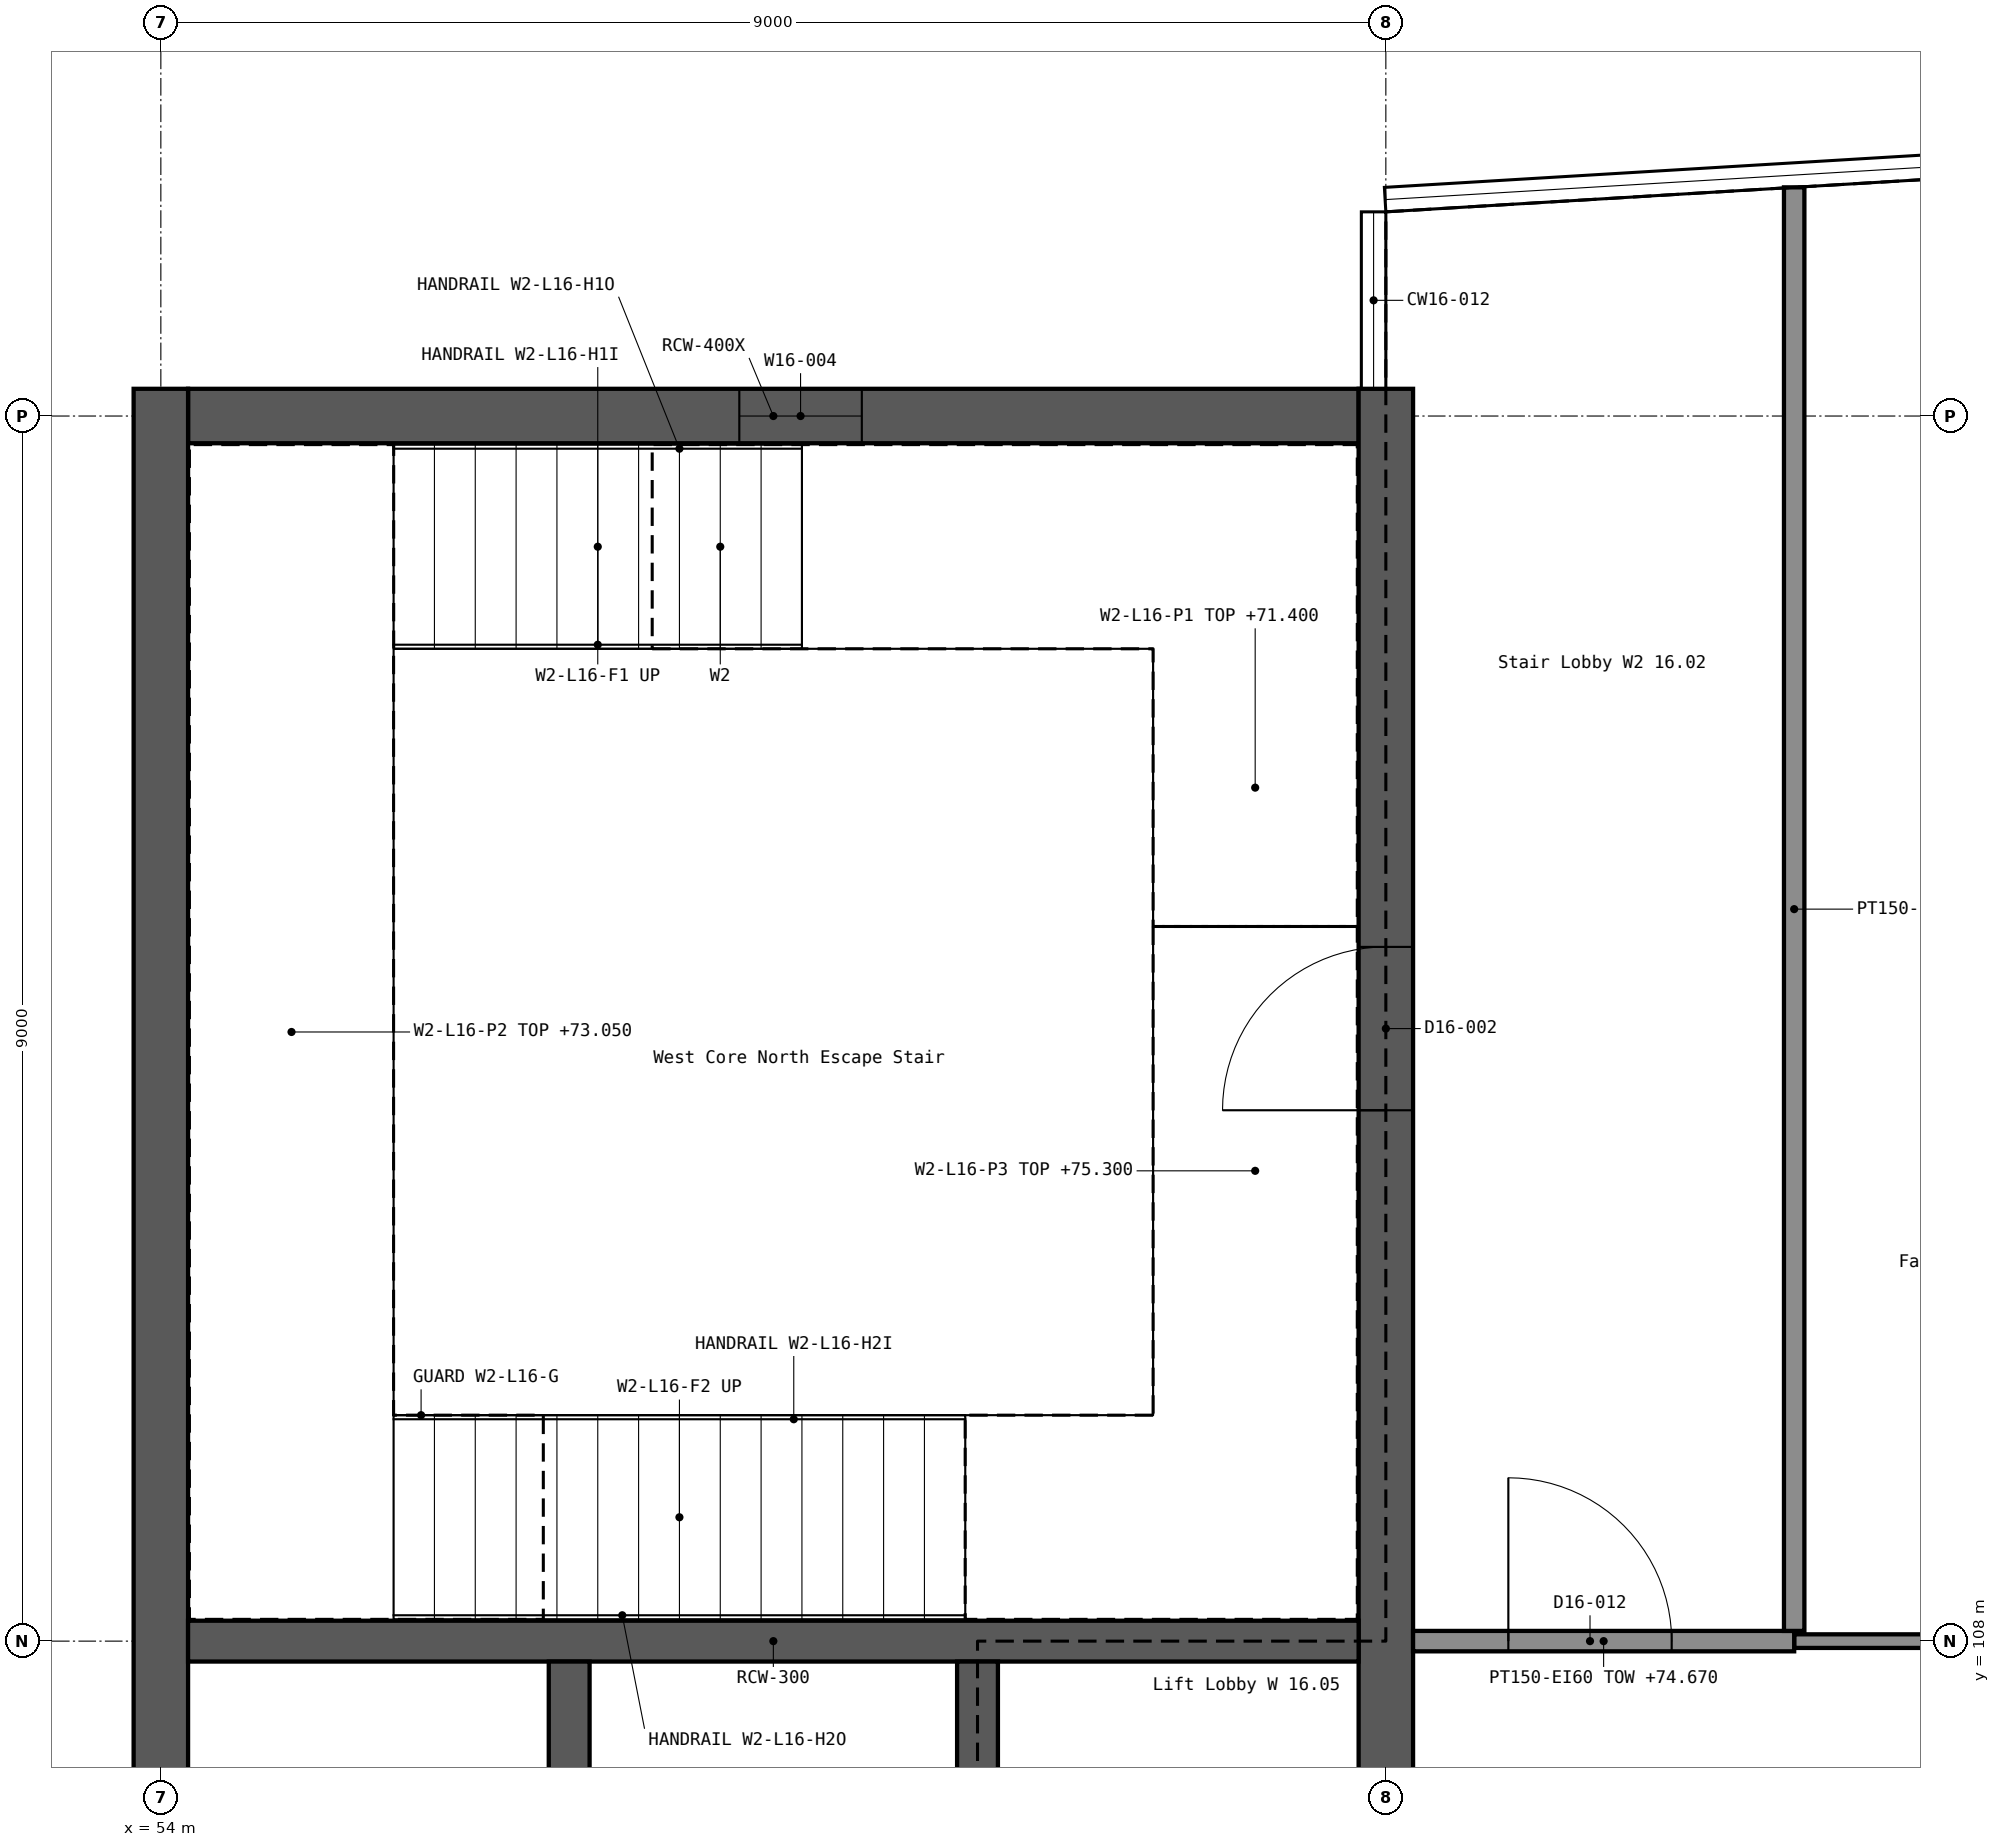
"""IFC4 building model, lengths in metres.
Left out: names, types, materials, properties, quantities, classifications, styles, units other than length and angle.
Written with IfcOpenShell. Run it as: python <this file> out.ifc"""

import sys

from ifc_helpers import new_model, si_unit, direction, frame, frame_2d, origin, place, context, subcontext, project, spatial, rectangle, extrude, element, fill, save


model = new_model("IFC4")
c1 = context("Model", 3, precision=1e-05, world=origin(), true_north=direction((0.0, 1.0)))
c2 = subcontext(c1, "Body", "Model", "MODEL_VIEW")
j1 = project(units=[si_unit("LENGTHUNIT", "METRE"), si_unit("PLANEANGLEUNIT", "RADIAN")], contexts=[c1])
p1 = place(None, origin())
s1 = spatial("IfcSite", under=j1, at=p1, CompositionType="ELEMENT")
p2 = place(p1, origin())
s2 = spatial("IfcBuilding", under=s1, at=p2, CompositionType="ELEMENT")
p3 = place(p2, frame((0.0, 0.0, 71.4)))
s3 = spatial("IfcBuildingStorey", under=s2, at=p3, CompositionType="ELEMENT", Elevation=71.4)
p4 = place(p3, frame((54.2, 117.0, 0.0), z_axis=(0.0, 0.0, 1.0), x_axis=(1.0, 0.0, 0.0)))
e1 = element("IfcWall", 1, at=p4, inside=s3, PredefinedType="SHEAR", context=c2, shape_type="SweptSolid", body=[
    extrude(rectangle(XDim=8.6, YDim=0.4, at=frame_2d((4.3, 0.0))), origin(), (0.0, 0.0, 1.0), 3.9),
])
p5 = place(p4, frame((4.05, 0.0, 1.2)))
e2 = element("IfcOpeningElement", 2, at=p5, cuts=e1, PredefinedType="OPENING", context=c2, shape_type="SweptSolid", body=[
    extrude(rectangle(XDim=0.9, YDim=1.5, at=frame_2d((0.45, 0.75))), frame((0.0, 0.211, 0.0), z_axis=(0.0, -1.0, 0.0), x_axis=(1.0, 0.0, 0.0)), (0.0, 0.0, 1.0), 0.422),
])
p6 = place(p3, frame((54.0, 89.8, 0.0), z_axis=(0.0, 0.0, 1.0), x_axis=(0.0, 1.0, 0.0)))
e3 = element("IfcWall", 3, at=p6, inside=s3, PredefinedType="SHEAR", context=c2, shape_type="SweptSolid", body=[
    extrude(rectangle(XDim=27.4, YDim=0.4, at=frame_2d((13.7, 0.0))), origin(), (0.0, 0.0, 1.0), 3.9),
])
p7 = place(p3, frame((63.0, 89.8, 0.0), z_axis=(0.0, 0.0, 1.0), x_axis=(0.0, 1.0, 0.0)))
e4 = element("IfcWall", 4, at=p7, inside=s3, PredefinedType="SHEAR", context=c2, shape_type="SweptSolid", body=[
    extrude(rectangle(XDim=27.4, YDim=0.4, at=frame_2d((13.7, 0.0))), origin(), (0.0, 0.0, 1.0), 3.9),
])
p8 = place(p7, frame((4.1, 0.0, 0.0)))
e5 = element("IfcOpeningElement", 5, at=p8, cuts=e4, PredefinedType="OPENING", context=c2, shape_type="SweptSolid", body=[
    extrude(rectangle(XDim=1.2, YDim=2.1, at=frame_2d((0.6, 1.05))), frame((0.0, 0.211, 0.0), z_axis=(0.0, -1.0, 0.0), x_axis=(1.0, 0.0, 0.0)), (0.0, 0.0, 1.0), 0.422),
])
p9 = place(p7, frame((22.1, 0.0, 0.0)))
e6 = element("IfcOpeningElement", 6, at=p9, cuts=e4, PredefinedType="OPENING", context=c2, shape_type="SweptSolid", body=[
    extrude(rectangle(XDim=1.2, YDim=2.1, at=frame_2d((0.6, 1.05))), frame((0.0, 0.211, 0.0), z_axis=(0.0, -1.0, 0.0), x_axis=(1.0, 0.0, 0.0)), (0.0, 0.0, 1.0), 0.422),
])
p10 = place(p7, frame((12.5, 0.0, 0.0)))
e7 = element("IfcOpeningElement", 7, at=p10, cuts=e4, PredefinedType="OPENING", context=c2, shape_type="SweptSolid", body=[
    extrude(rectangle(XDim=2.0, YDim=2.1, at=frame_2d((1.0, 1.05))), frame((0.0, 0.211, 0.0), z_axis=(0.0, -1.0, 0.0), x_axis=(1.0, 0.0, 0.0)), (0.0, 0.0, 1.0), 0.422),
])
p11 = place(p3, frame((54.2, 108.0, 0.0), z_axis=(0.0, 0.0, 1.0), x_axis=(1.0, 0.0, 0.0)))
e8 = element("IfcWall", 8, at=p11, inside=s3, PredefinedType="SHEAR", context=c2, shape_type="SweptSolid", body=[
    extrude(rectangle(XDim=8.6, YDim=0.3, at=frame_2d((4.3, 0.0))), origin(), (0.0, 0.0, 1.0), 3.9),
])
p12 = place(p3, frame((57.0, 99.15, 0.0), z_axis=(0.0, 0.0, 1.0), x_axis=(0.0, 1.0, 0.0)))
e9 = element("IfcWall", 9, at=p12, inside=s3, PredefinedType="SHEAR", context=c2, shape_type="SweptSolid", body=[
    extrude(rectangle(XDim=8.7, YDim=0.3, at=frame_2d((4.35, 0.0))), origin(), (0.0, 0.0, 1.0), 3.9),
])
p13 = place(p3, frame((60.0, 99.15, 0.0), z_axis=(0.0, 0.0, 1.0), x_axis=(0.0, 1.0, 0.0)))
e10 = element("IfcWall", 10, at=p13, inside=s3, PredefinedType="SHEAR", context=c2, shape_type="SweptSolid", body=[
    extrude(rectangle(XDim=8.7, YDim=0.3, at=frame_2d((4.35, 0.0))), origin(), (0.0, 0.0, 1.0), 3.9),
])
p14 = place(p13, frame((0.8, 0.0, 0.0)))
e11 = element("IfcOpeningElement", 11, at=p14, cuts=e10, PredefinedType="OPENING", context=c2, shape_type="SweptSolid", body=[
    extrude(rectangle(XDim=1.1, YDim=2.1, at=frame_2d((0.55, 1.05))), frame((0.0, 0.161, 0.0), z_axis=(0.0, -1.0, 0.0), x_axis=(1.0, 0.0, 0.0)), (0.0, 0.0, 1.0), 0.322),
])
p15 = place(p13, frame((3.8, 0.0, 0.0)))
e12 = element("IfcOpeningElement", 12, at=p15, cuts=e10, PredefinedType="OPENING", context=c2, shape_type="SweptSolid", body=[
    extrude(rectangle(XDim=1.1, YDim=2.1, at=frame_2d((0.55, 1.05))), frame((0.0, 0.161, 0.0), z_axis=(0.0, -1.0, 0.0), x_axis=(1.0, 0.0, 0.0)), (0.0, 0.0, 1.0), 0.322),
])
p16 = place(p13, frame((6.8, 0.0, 0.0)))
e13 = element("IfcOpeningElement", 13, at=p16, cuts=e10, PredefinedType="OPENING", context=c2, shape_type="SweptSolid", body=[
    extrude(rectangle(XDim=1.1, YDim=2.1, at=frame_2d((0.55, 1.05))), frame((0.0, 0.161, 0.0), z_axis=(0.0, -1.0, 0.0), x_axis=(1.0, 0.0, 0.0)), (0.0, 0.0, 1.0), 0.322),
])
p17 = place(p3, frame((66.0, 108.0, 0.0), z_axis=(0.0, 0.0, 1.0), x_axis=(1.0, 0.0, 0.0)))
e14 = element("IfcWall", 14, at=p17, inside=s3, PredefinedType="PARTITIONING", context=c2, shape_type="SweptSolid", body=[
    extrude(rectangle(XDim=5.87, YDim=0.1, at=frame_2d((2.935, 0.0))), origin(), (0.0, 0.0, 1.0), 3.27),
])
p18 = place(p17, frame((1.05, 0.0, 0.0)))
e15 = element("IfcOpeningElement", 15, at=p18, cuts=e14, PredefinedType="OPENING", context=c2, shape_type="SweptSolid", body=[
    extrude(rectangle(XDim=0.9, YDim=2.1, at=frame_2d((0.45, 1.05))), frame((0.0, 0.061, 0.0), z_axis=(0.0, -1.0, 0.0), x_axis=(1.0, 0.0, 0.0)), (0.0, 0.0, 1.0), 0.122),
])
p19 = place(p17, frame((4.05, 0.0, 0.0)))
e16 = element("IfcOpeningElement", 16, at=p19, cuts=e14, PredefinedType="OPENING", context=c2, shape_type="SweptSolid", body=[
    extrude(rectangle(XDim=0.9, YDim=2.1, at=frame_2d((0.45, 1.05))), frame((0.0, 0.061, 0.0), z_axis=(0.0, -1.0, 0.0), x_axis=(1.0, 0.0, 0.0)), (0.0, 0.0, 1.0), 0.122),
])
p20 = place(p3, frame((63.2, 108.0, 0.0), z_axis=(0.0, 0.0, 1.0), x_axis=(1.0, 0.0, 0.0)))
e17 = element("IfcWall", 17, at=p20, inside=s3, PredefinedType="PARTITIONING", context=c2, shape_type="SweptSolid", body=[
    extrude(rectangle(XDim=2.8, YDim=0.15, at=frame_2d((1.4, 0.0))), origin(), (0.0, 0.0, 1.0), 3.27),
])
p21 = place(p20, frame((0.7, 0.0, 0.0)))
e18 = element("IfcOpeningElement", 18, at=p21, cuts=e17, PredefinedType="OPENING", context=c2, shape_type="SweptSolid", body=[
    extrude(rectangle(XDim=1.2, YDim=2.1, at=frame_2d((0.6, 1.05))), frame((0.0, 0.086, 0.0), z_axis=(0.0, -1.0, 0.0), x_axis=(1.0, 0.0, 0.0)), (0.0, 0.0, 1.0), 0.172),
])
p22 = place(p3, frame((66.0, 108.075, 0.0), z_axis=(0.0, 0.0, 1.0), x_axis=(0.0, 1.0, 0.0)))
e19 = element("IfcWall", 19, at=p22, inside=s3, PredefinedType="PARTITIONING", context=c2, shape_type="SweptSolid", body=[
    extrude(rectangle(XDim=10.605, YDim=0.15, at=frame_2d((5.302, 0.0))), origin(), (0.0, 0.0, 1.0), 3.41),
])
p23 = place(p5, origin())
e20 = element("IfcWindow", 20, at=p23, inside=s3, PartitioningType="SINGLE_PANEL", PredefinedType="WINDOW", context=c2, shape_type="SweptSolid", body=[
    extrude(rectangle(XDim=0.9, YDim=1.5, at=frame_2d((0.45, 0.75))), frame((0.0, 0.03, 0.0), z_axis=(0.0, -1.0, 0.0), x_axis=(1.0, 0.0, 0.0)), (0.0, 0.0, 1.0), 0.06),
])
fill(e2, e20)
p24 = place(p9, origin())
e21 = element("IfcDoor", 21, at=p24, inside=s3, OperationType="SINGLE_SWING_LEFT", PredefinedType="DOOR", context=c2, shape_type="SweptSolid", body=[
    extrude(rectangle(XDim=1.2, YDim=2.1, at=frame_2d((0.6, 1.05))), frame((0.0, 0.025, 0.0), z_axis=(0.0, -1.0, 0.0), x_axis=(1.0, 0.0, 0.0)), (0.0, 0.0, 1.0), 0.05),
])
fill(e6, e21)
p25 = place(p21, origin())
e22 = element("IfcDoor", 22, at=p25, inside=s3, OperationType="SINGLE_SWING_LEFT", PredefinedType="DOOR", context=c2, shape_type="SweptSolid", body=[
    extrude(rectangle(XDim=1.2, YDim=2.1, at=frame_2d((0.6, 1.05))), frame((0.0, 0.025, 0.0), z_axis=(0.0, -1.0, 0.0), x_axis=(1.0, 0.0, 0.0)), (0.0, 0.0, 1.0), 0.05),
])
fill(e18, e22)
save(model, sys.argv[1])
